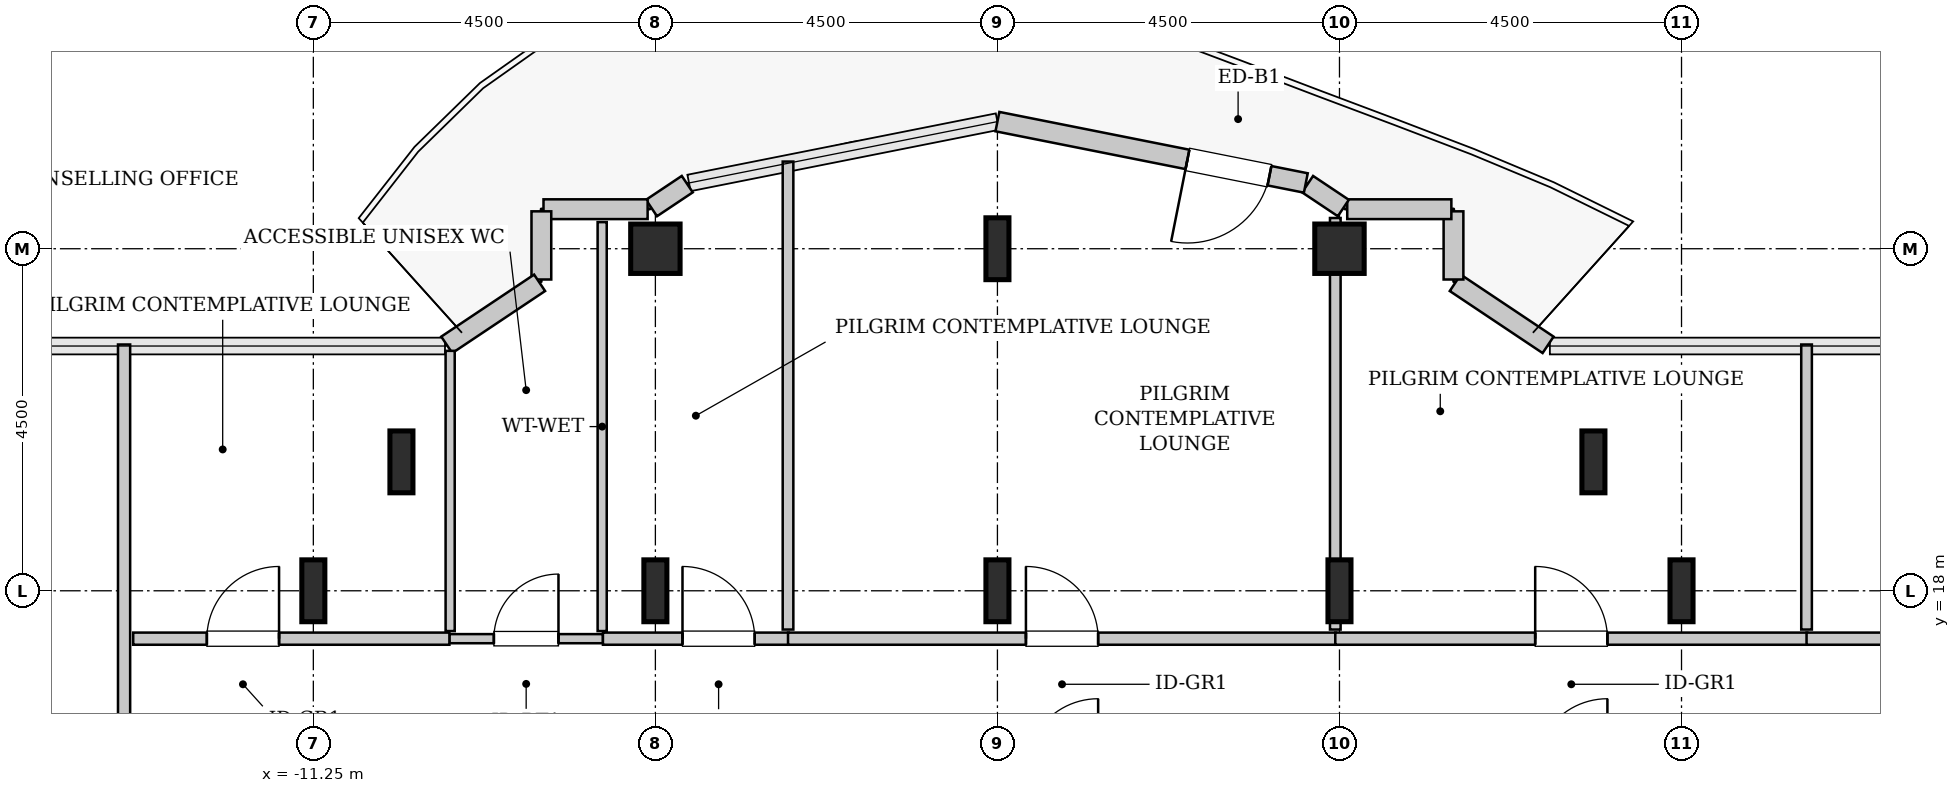
"""IFC4 building model, lengths in metres.
Left out: names, types, materials, properties, quantities, classifications, styles, units other than length and angle.
Written with IfcOpenShell. Run it as: python <this file> out.ifc"""

import sys

from ifc_helpers import new_model, si_unit, direction, frame, frame_2d, origin, origin_2d, place, context, subcontext, project, spatial, rectangle, hollow_rectangle, i_section, extrude, source, transform, mapped, element, fill, save


model = new_model("IFC4")
c1 = context("Model", 3, precision=1e-05, world=origin(), true_north=direction((0.0, 1.0)))
c2 = subcontext(c1, "Body", "Model", "MODEL_VIEW")
j1 = project(units=[si_unit("LENGTHUNIT", "METRE"), si_unit("PLANEANGLEUNIT", "RADIAN")], contexts=[c1])
p1 = place(None, origin())
s1 = spatial("IfcSite", under=j1, at=p1, CompositionType="ELEMENT")
p2 = place(p1, origin())
s2 = spatial("IfcBuilding", under=s1, at=p2, CompositionType="ELEMENT")
p3 = place(p2, frame((0.0, 0.0, 240.8)))
s3 = spatial("IfcBuildingStorey", under=s2, at=p3, CompositionType="ELEMENT", Elevation=240.8)
m1 = source(origin(), c2, "Body", "SweptSolid", [
    extrude(i_section(OverallWidth=0.303, OverallDepth=0.814, WebThickness=0.021, FlangeThickness=0.04, FilletRadius=0.03, at=origin_2d()), origin(), (0.0, 0.0, 1.0), 3.8),
])
for number, where, z_axis, x_axis in (
    (1, (-11.25, 18.0, 0.0), (0.0, 0.0, 1.0), (1.0, 0.0, 0.0)),
    (2, (-10.091, 19.696, 0.0), (0.0, 0.0, 1.0), (1.0, 0.0, 0.0)),
    (3, (-6.75, 18.0, 0.0), (0.0, 0.0, 1.0), (1.0, 0.0, 0.0)),
):
    element("IfcColumn", number, at=place(p3, frame(where, z_axis=z_axis, x_axis=x_axis)), inside=s3, PredefinedType="COLUMN", context=c2, shape_type="MappedRepresentation", body=[
        mapped(m1, transform((0.0, 0.0, 0.0), x_axis=(1.0, 0.0, 0.0), y_axis=(0.0, 1.0, 0.0), z_axis=(0.0, 0.0, 1.0), scale=1.0)),
    ])
m2 = source(origin(), c2, "Body", "SweptSolid", [
    extrude(hollow_rectangle(XDim=0.65, YDim=0.65, WallThickness=0.032, InnerFilletRadius=0.032, OuterFilletRadius=0.064, at=origin_2d()), origin(), (0.0, 0.0, 1.0), 3.8),
])
p4 = place(p3, frame((-6.75, 22.5, 0.0), z_axis=(0.0, 0.0, 1.0), x_axis=(1.0, 0.0, 0.0)))
e4 = element("IfcColumn", 4, at=p4, inside=s3, PredefinedType="COLUMN", context=c2, shape_type="MappedRepresentation", body=[
    mapped(m2, transform((0.0, 0.0, 0.0), x_axis=(1.0, 0.0, 0.0), y_axis=(0.0, 1.0, 0.0), z_axis=(0.0, 0.0, 1.0), scale=1.0)),
])
for number, where, z_axis, x_axis in (
    (5, (-2.25, 18.0, 0.0), (0.0, 0.0, 1.0), (1.0, 0.0, 0.0)),
    (6, (-2.25, 22.5, 0.0), (0.0, 0.0, 1.0), (1.0, 0.0, 0.0)),
    (7, (2.25, 18.0, 0.0), (0.0, 0.0, 1.0), (1.0, 0.0, 0.0)),
):
    element("IfcColumn", number, at=place(p3, frame(where, z_axis=z_axis, x_axis=x_axis)), inside=s3, PredefinedType="COLUMN", context=c2, shape_type="MappedRepresentation", body=[
        mapped(m1, transform((0.0, 0.0, 0.0), x_axis=(1.0, 0.0, 0.0), y_axis=(0.0, 1.0, 0.0), z_axis=(0.0, 0.0, 1.0), scale=1.0)),
    ])
p5 = place(p3, frame((2.25, 22.5, 0.0), z_axis=(0.0, 0.0, 1.0), x_axis=(1.0, 0.0, 0.0)))
e8 = element("IfcColumn", 8, at=p5, inside=s3, PredefinedType="COLUMN", context=c2, shape_type="MappedRepresentation", body=[
    mapped(m2, transform((0.0, 0.0, 0.0), x_axis=(1.0, 0.0, 0.0), y_axis=(0.0, 1.0, 0.0), z_axis=(0.0, 0.0, 1.0), scale=1.0)),
])
for number, where, z_axis, x_axis in (
    (9, (5.591, 19.696, 0.0), (0.0, 0.0, 1.0), (1.0, 0.0, 0.0)),
    (10, (6.75, 18.0, 0.0), (0.0, 0.0, 1.0), (1.0, 0.0, 0.0)),
):
    element("IfcColumn", number, at=place(p3, frame(where, z_axis=z_axis, x_axis=x_axis)), inside=s3, PredefinedType="COLUMN", context=c2, shape_type="MappedRepresentation", body=[
        mapped(m1, transform((0.0, 0.0, 0.0), x_axis=(1.0, 0.0, 0.0), y_axis=(0.0, 1.0, 0.0), z_axis=(0.0, 0.0, 1.0), scale=1.0)),
    ])
m3 = source(origin(), c2, "Body", "SweptSolid", [
    extrude(rectangle(XDim=1.469, YDim=0.26, at=frame_2d((0.734, 0.0))), origin(), (0.0, 0.0, 1.0), 3.55),
])
p6 = place(p3, frame((4.995, 21.236, 0.0), z_axis=(0.0, 0.0, 1.0), x_axis=(-0.831461760506, 0.555581983884, 0.0)))
e11 = element("IfcWall", 11, at=p6, inside=s3, PredefinedType="SOLIDWALL", context=c2, shape_type="MappedRepresentation", body=[
    mapped(m3, transform((0.0, 0.0, 0.0), x_axis=(1.0, 0.0, 0.0), y_axis=(0.0, 1.0, 0.0), z_axis=(0.0, 0.0, 1.0), scale=1.0)),
])
m4 = source(origin(), c2, "Body", "SweptSolid", [
    extrude(rectangle(XDim=0.897, YDim=0.26, at=frame_2d((0.448, 0.0))), origin(), (0.0, 0.0, 1.0), 3.55),
])
p7 = place(p3, frame((3.75, 22.095, 0.0), z_axis=(0.0, 0.0, 1.0), x_axis=(0.0, 1.0, 0.0)))
e12 = element("IfcWall", 12, at=p7, inside=s3, PredefinedType="SOLIDWALL", context=c2, shape_type="MappedRepresentation", body=[
    mapped(m4, transform((0.0, 0.0, 0.0), x_axis=(1.0, 0.0, 0.0), y_axis=(0.0, 1.0, 0.0), z_axis=(0.0, 0.0, 1.0), scale=1.0)),
])
m5 = source(origin(), c2, "Body", "SweptSolid", [
    extrude(rectangle(XDim=1.37, YDim=0.26, at=frame_2d((0.685, 0.0))), origin(), (0.0, 0.0, 1.0), 3.55),
])
p8 = place(p3, frame((3.722, 23.02, 0.0), z_axis=(0.0, 0.0, 1.0), x_axis=(-1.0, 0.0, 0.0)))
e13 = element("IfcWall", 13, at=p8, inside=s3, PredefinedType="SOLIDWALL", context=c2, shape_type="MappedRepresentation", body=[
    mapped(m5, transform((0.0, 0.0, 0.0), x_axis=(1.0, 0.0, 0.0), y_axis=(0.0, 1.0, 0.0), z_axis=(0.0, 0.0, 1.0), scale=1.0)),
])
m6 = source(origin(), c2, "Body", "SweptSolid", [
    extrude(rectangle(XDim=0.565, YDim=0.26, at=frame_2d((0.283, 0.0))), origin(), (0.0, 0.0, 1.0), 3.55),
])
p9 = place(p3, frame((2.301, 23.036, 0.0), z_axis=(0.0, 0.0, 1.0), x_axis=(-0.831651492666, 0.555297933317, 0.0)))
e14 = element("IfcWall", 14, at=p9, inside=s3, PredefinedType="SOLIDWALL", context=c2, shape_type="MappedRepresentation", body=[
    mapped(m6, transform((0.0, 0.0, 0.0), x_axis=(1.0, 0.0, 0.0), y_axis=(0.0, 1.0, 0.0), z_axis=(0.0, 0.0, 1.0), scale=1.0)),
])
m7 = source(origin(), c2, "Body", "SweptSolid", [
    extrude(rectangle(XDim=4.137, YDim=0.26, at=frame_2d((2.068, 0.0))), origin(), (0.0, 0.0, 1.0), 3.55),
])
p10 = place(p3, frame((1.807, 23.365, 0.0), z_axis=(0.0, 0.0, 1.0), x_axis=(-0.980782170794, 0.195105954428, 0.0)))
e15 = element("IfcWall", 15, at=p10, inside=s3, PredefinedType="SOLIDWALL", context=c2, shape_type="MappedRepresentation", body=[
    mapped(m7, transform((0.0, 0.0, 0.0), x_axis=(1.0, 0.0, 0.0), y_axis=(0.0, 1.0, 0.0), z_axis=(0.0, 0.0, 1.0), scale=1.0)),
])
p11 = place(p10, frame((0.488, 0.0, 0.0)))
e16 = element("IfcOpeningElement", 16, at=p11, cuts=e15, PredefinedType="OPENING", context=c2, shape_type="SweptSolid", body=[
    extrude(rectangle(XDim=1.1, YDim=2.2, at=frame_2d((0.55, 1.1))), frame((0.0, 0.14, 0.0), z_axis=(0.0, -1.0, 0.0), x_axis=(1.0, 0.0, 0.0)), (0.0, 0.0, 1.0), 0.28),
])
p12 = place(p3, frame((-6.331, 23.35, 0.0), z_axis=(0.0, 0.0, 1.0), x_axis=(-0.831651492666, -0.555297933317, 0.0)))
e17 = element("IfcWall", 17, at=p12, inside=s3, PredefinedType="SOLIDWALL", context=c2, shape_type="MappedRepresentation", body=[
    mapped(m6, transform((0.0, 0.0, 0.0), x_axis=(1.0, 0.0, 0.0), y_axis=(0.0, 1.0, 0.0), z_axis=(0.0, 0.0, 1.0), scale=1.0)),
])
p13 = place(p3, frame((-6.852, 23.02, 0.0), z_axis=(0.0, 0.0, 1.0), x_axis=(-1.0, 0.0, 0.0)))
e18 = element("IfcWall", 18, at=p13, inside=s3, PredefinedType="SOLIDWALL", context=c2, shape_type="MappedRepresentation", body=[
    mapped(m5, transform((0.0, 0.0, 0.0), x_axis=(1.0, 0.0, 0.0), y_axis=(0.0, 1.0, 0.0), z_axis=(0.0, 0.0, 1.0), scale=1.0)),
])
p14 = place(p3, frame((-8.25, 22.992, 0.0), z_axis=(0.0, 0.0, 1.0), x_axis=(0.0, -1.0, 0.0)))
e19 = element("IfcWall", 19, at=p14, inside=s3, PredefinedType="SOLIDWALL", context=c2, shape_type="MappedRepresentation", body=[
    mapped(m4, transform((0.0, 0.0, 0.0), x_axis=(1.0, 0.0, 0.0), y_axis=(0.0, 1.0, 0.0), z_axis=(0.0, 0.0, 1.0), scale=1.0)),
])
p15 = place(p3, frame((-8.273, 22.052, 0.0), z_axis=(0.0, 0.0, 1.0), x_axis=(-0.831461760506, -0.555581983884, 0.0)))
e20 = element("IfcWall", 20, at=p15, inside=s3, PredefinedType="SOLIDWALL", context=c2, shape_type="MappedRepresentation", body=[
    mapped(m3, transform((0.0, 0.0, 0.0), x_axis=(1.0, 0.0, 0.0), y_axis=(0.0, 1.0, 0.0), z_axis=(0.0, 0.0, 1.0), scale=1.0)),
])
m8 = source(origin(), c2, "Body", "SweptSolid", [
    extrude(rectangle(XDim=2.02, YDim=0.12, at=frame_2d((1.01, 0.0))), origin(), (0.0, 0.0, 1.0), 3.535),
])
p16 = place(p3, frame((-9.46, 17.37, 0.0), z_axis=(0.0, 0.0, 1.0), x_axis=(1.0, 0.0, 0.0)))
e21 = element("IfcWall", 21, at=p16, inside=s3, PredefinedType="PLUMBINGWALL", context=c2, shape_type="MappedRepresentation", body=[
    mapped(m8, transform((0.0, 0.0, 0.0), x_axis=(1.0, 0.0, 0.0), y_axis=(0.0, 1.0, 0.0), z_axis=(0.0, 0.0, 1.0), scale=1.0)),
])
p17 = place(p16, frame((0.585, 0.0, 0.0)))
e22 = element("IfcOpeningElement", 22, at=p17, cuts=e21, PredefinedType="OPENING", context=c2, shape_type="SweptSolid", body=[
    extrude(rectangle(XDim=0.85, YDim=2.1, at=frame_2d((0.425, 1.05))), frame((0.0, 0.07, 0.0), z_axis=(0.0, -1.0, 0.0), x_axis=(1.0, 0.0, 0.0)), (0.0, 0.0, 1.0), 0.14),
])
m9 = source(origin(), c2, "Body", "SweptSolid", [
    extrude(rectangle(XDim=5.38, YDim=0.12, at=frame_2d((2.69, 0.0))), origin(), (0.0, 0.0, 1.0), 3.535),
])
p18 = place(p3, frame((-7.45, 17.47, 0.0), z_axis=(0.0, 0.0, 1.0), x_axis=(0.0, 1.0, 0.0)))
e23 = element("IfcWall", 23, at=p18, inside=s3, PredefinedType="PLUMBINGWALL", context=c2, shape_type="MappedRepresentation", body=[
    mapped(m9, transform((0.0, 0.0, 0.0), x_axis=(1.0, 0.0, 0.0), y_axis=(0.0, 1.0, 0.0), z_axis=(0.0, 0.0, 1.0), scale=1.0)),
])
m10 = source(origin(), c2, "Body", "SweptSolid", [
    extrude(rectangle(XDim=3.687, YDim=0.12, at=frame_2d((1.843, 0.0))), origin(), (0.0, 0.0, 1.0), 3.535),
])
p19 = place(p3, frame((-9.45, 17.47, 0.0), z_axis=(0.0, 0.0, 1.0), x_axis=(0.0, 1.0, 0.0)))
e24 = element("IfcWall", 24, at=p19, inside=s3, PredefinedType="PLUMBINGWALL", context=c2, shape_type="MappedRepresentation", body=[
    mapped(m10, transform((0.0, 0.0, 0.0), x_axis=(1.0, 0.0, 0.0), y_axis=(0.0, 1.0, 0.0), z_axis=(0.0, 0.0, 1.0), scale=1.0)),
])
m11 = source(origin(), c2, "Body", "SweptSolid", [
    extrude(rectangle(XDim=6.952, YDim=0.16, at=frame_2d((3.476, 0.0))), origin(), (0.0, 0.0, 1.0), 3.535),
])
p20 = place(p3, frame((-13.74, 14.288, 0.0), z_axis=(0.0, 0.0, 1.0), x_axis=(0.0, 1.0, 0.0)))
e25 = element("IfcWall", 25, at=p20, inside=s3, PredefinedType="PARTITIONING", context=c2, shape_type="MappedRepresentation", body=[
    mapped(m11, transform((0.0, 0.0, 0.0), x_axis=(1.0, 0.0, 0.0), y_axis=(0.0, 1.0, 0.0), z_axis=(0.0, 0.0, 1.0), scale=1.0)),
])
p21 = place(p20, frame((1.086, 0.0, 0.0)))
e26 = element("IfcOpeningElement", 26, at=p21, cuts=e25, PredefinedType="OPENING", context=c2, shape_type="SweptSolid", body=[
    extrude(rectangle(XDim=0.95, YDim=2.1, at=frame_2d((0.475, 1.05))), frame((0.0, 0.09, 0.0), z_axis=(0.0, -1.0, 0.0), x_axis=(1.0, 0.0, 0.0)), (0.0, 0.0, 1.0), 0.18),
])
m12 = source(origin(), c2, "Body", "SweptSolid", [
    extrude(rectangle(XDim=2.445, YDim=0.16, at=frame_2d((1.222, 0.0))), origin(), (0.0, 0.0, 1.0), 3.535),
])
p22 = place(p3, frame((-7.44, 17.37, 0.0), z_axis=(0.0, 0.0, 1.0), x_axis=(1.0, 0.0, 0.0)))
e27 = element("IfcWall", 27, at=p22, inside=s3, PredefinedType="PARTITIONING", context=c2, shape_type="MappedRepresentation", body=[
    mapped(m12, transform((0.0, 0.0, 0.0), x_axis=(1.0, 0.0, 0.0), y_axis=(0.0, 1.0, 0.0), z_axis=(0.0, 0.0, 1.0), scale=1.0)),
])
p23 = place(p22, frame((1.047, 0.0, 0.0)))
e28 = element("IfcOpeningElement", 28, at=p23, cuts=e27, PredefinedType="OPENING", context=c2, shape_type="SweptSolid", body=[
    extrude(rectangle(XDim=0.95, YDim=2.1, at=frame_2d((0.475, 1.05))), frame((0.0, 0.09, 0.0), z_axis=(0.0, -1.0, 0.0), x_axis=(1.0, 0.0, 0.0)), (0.0, 0.0, 1.0), 0.18),
])
m13 = source(origin(), c2, "Body", "SweptSolid", [
    extrude(rectangle(XDim=6.157, YDim=0.14, at=frame_2d((3.078, 0.0))), origin(), (0.0, 0.0, 1.0), 3.535),
])
p24 = place(p3, frame((-5.005, 17.49, 0.0), z_axis=(0.0, 0.0, 1.0), x_axis=(0.0, 1.0, 0.0)))
e29 = element("IfcWall", 29, at=p24, inside=s3, PredefinedType="PARTITIONING", context=c2, shape_type="MappedRepresentation", body=[
    mapped(m13, transform((0.0, 0.0, 0.0), x_axis=(1.0, 0.0, 0.0), y_axis=(0.0, 1.0, 0.0), z_axis=(0.0, 0.0, 1.0), scale=1.0)),
])
m14 = source(origin(), c2, "Body", "SweptSolid", [
    extrude(rectangle(XDim=4.16, YDim=0.16, at=frame_2d((2.08, 0.0))), origin(), (0.0, 0.0, 1.0), 3.535),
])
p25 = place(p3, frame((-13.62, 17.37, 0.0), z_axis=(0.0, 0.0, 1.0), x_axis=(1.0, 0.0, 0.0)))
e30 = element("IfcWall", 30, at=p25, inside=s3, PredefinedType="PARTITIONING", context=c2, shape_type="MappedRepresentation", body=[
    mapped(m14, transform((0.0, 0.0, 0.0), x_axis=(1.0, 0.0, 0.0), y_axis=(0.0, 1.0, 0.0), z_axis=(0.0, 0.0, 1.0), scale=1.0)),
])
p26 = place(p25, frame((0.969, 0.0, 0.0)))
e31 = element("IfcOpeningElement", 31, at=p26, cuts=e30, PredefinedType="OPENING", context=c2, shape_type="SweptSolid", body=[
    extrude(rectangle(XDim=0.95, YDim=2.1, at=frame_2d((0.475, 1.05))), frame((0.0, 0.09, 0.0), z_axis=(0.0, -1.0, 0.0), x_axis=(1.0, 0.0, 0.0)), (0.0, 0.0, 1.0), 0.18),
])
m15 = source(origin(), c2, "Body", "SweptSolid", [
    extrude(rectangle(XDim=7.21, YDim=0.16, at=frame_2d((3.605, 0.0))), origin(), (0.0, 0.0, 1.0), 3.535),
])
p27 = place(p3, frame((-5.005, 17.37, 0.0), z_axis=(0.0, 0.0, 1.0), x_axis=(1.0, 0.0, 0.0)))
e32 = element("IfcWall", 32, at=p27, inside=s3, PredefinedType="PARTITIONING", context=c2, shape_type="MappedRepresentation", body=[
    mapped(m15, transform((0.0, 0.0, 0.0), x_axis=(1.0, 0.0, 0.0), y_axis=(0.0, 1.0, 0.0), z_axis=(0.0, 0.0, 1.0), scale=1.0)),
])
p28 = place(p27, frame((3.13, 0.0, 0.0)))
e33 = element("IfcOpeningElement", 33, at=p28, cuts=e32, PredefinedType="OPENING", context=c2, shape_type="SweptSolid", body=[
    extrude(rectangle(XDim=0.95, YDim=2.1, at=frame_2d((0.475, 1.05))), frame((0.0, 0.09, 0.0), z_axis=(0.0, -1.0, 0.0), x_axis=(1.0, 0.0, 0.0)), (0.0, 0.0, 1.0), 0.18),
])
m16 = source(origin(), c2, "Body", "SweptSolid", [
    extrude(rectangle(XDim=5.414, YDim=0.14, at=frame_2d((2.707, 0.0))), origin(), (0.0, 0.0, 1.0), 2.925),
])
p29 = place(p3, frame((2.195, 17.49, 0.0), z_axis=(0.0, 0.0, 1.0), x_axis=(0.0, 1.0, 0.0)))
e34 = element("IfcWall", 34, at=p29, inside=s3, PredefinedType="PARTITIONING", context=c2, shape_type="MappedRepresentation", body=[
    mapped(m16, transform((0.0, 0.0, 0.0), x_axis=(1.0, 0.0, 0.0), y_axis=(0.0, 1.0, 0.0), z_axis=(0.0, 0.0, 1.0), scale=1.0)),
])
m17 = source(origin(), c2, "Body", "SweptSolid", [
    extrude(rectangle(XDim=6.21, YDim=0.16, at=frame_2d((3.105, 0.0))), origin(), (0.0, 0.0, 1.0), 3.535),
])
p30 = place(p3, frame((2.195, 17.37, 0.0), z_axis=(0.0, 0.0, 1.0), x_axis=(1.0, 0.0, 0.0)))
e35 = element("IfcWall", 35, at=p30, inside=s3, PredefinedType="PARTITIONING", context=c2, shape_type="MappedRepresentation", body=[
    mapped(m17, transform((0.0, 0.0, 0.0), x_axis=(1.0, 0.0, 0.0), y_axis=(0.0, 1.0, 0.0), z_axis=(0.0, 0.0, 1.0), scale=1.0)),
])
p31 = place(p30, frame((2.63, 0.0, 0.0)))
e36 = element("IfcOpeningElement", 36, at=p31, cuts=e35, PredefinedType="OPENING", context=c2, shape_type="SweptSolid", body=[
    extrude(rectangle(XDim=0.95, YDim=2.1, at=frame_2d((0.475, 1.05))), frame((0.0, 0.09, 0.0), z_axis=(0.0, -1.0, 0.0), x_axis=(1.0, 0.0, 0.0)), (0.0, 0.0, 1.0), 0.18),
])
m18 = source(origin(), c2, "Body", "SweptSolid", [
    extrude(rectangle(XDim=3.75, YDim=0.14, at=frame_2d((1.875, 0.0))), origin(), (0.0, 0.0, 1.0), 3.535),
])
p32 = place(p3, frame((8.395, 17.49, 0.0), z_axis=(0.0, 0.0, 1.0), x_axis=(0.0, 1.0, 0.0)))
e37 = element("IfcWall", 37, at=p32, inside=s3, PredefinedType="PARTITIONING", context=c2, shape_type="MappedRepresentation", body=[
    mapped(m18, transform((0.0, 0.0, 0.0), x_axis=(1.0, 0.0, 0.0), y_axis=(0.0, 1.0, 0.0), z_axis=(0.0, 0.0, 1.0), scale=1.0)),
])
m19 = source(origin(), c2, "Body", "SweptSolid", [
    extrude(rectangle(XDim=5.225, YDim=0.16, at=frame_2d((2.613, 0.0))), origin(), (0.0, 0.0, 1.0), 3.535),
])
p33 = place(p3, frame((8.395, 17.37, 0.0), z_axis=(0.0, 0.0, 1.0), x_axis=(1.0, 0.0, 0.0)))
e38 = element("IfcWall", 38, at=p33, inside=s3, PredefinedType="PARTITIONING", context=c2, shape_type="MappedRepresentation", body=[
    mapped(m19, transform((0.0, 0.0, 0.0), x_axis=(1.0, 0.0, 0.0), y_axis=(0.0, 1.0, 0.0), z_axis=(0.0, 0.0, 1.0), scale=1.0)),
])
p34 = place(p33, frame((1.543, 0.0, 0.0)))
e39 = element("IfcOpeningElement", 39, at=p34, cuts=e38, PredefinedType="OPENING", context=c2, shape_type="SweptSolid", body=[
    extrude(rectangle(XDim=0.95, YDim=2.1, at=frame_2d((0.475, 1.05))), frame((0.0, 0.09, 0.0), z_axis=(0.0, -1.0, 0.0), x_axis=(1.0, 0.0, 0.0)), (0.0, 0.0, 1.0), 0.18),
])
m20 = source(origin(), c2, "Body", "SweptSolid", [
    extrude(rectangle(XDim=1.1, YDim=2.2, at=frame_2d((0.55, 1.1))), frame((0.0, 0.025, 0.0), z_axis=(0.0, -1.0, 0.0), x_axis=(1.0, 0.0, 0.0)), (0.0, 0.0, 1.0), 0.05),
])
p35 = place(p11, origin())
e40 = element("IfcDoor", 40, at=p35, inside=s3, OperationType="SINGLE_SWING_RIGHT", PredefinedType="DOOR", context=c2, shape_type="MappedRepresentation", body=[
    mapped(m20, transform((0.0, 0.0, 0.0), x_axis=(1.0, 0.0, 0.0), y_axis=(0.0, 1.0, 0.0), z_axis=(0.0, 0.0, 1.0), scale=1.0)),
])
fill(e16, e40)
m21 = source(origin(), c2, "Body", "SweptSolid", [
    extrude(rectangle(XDim=0.85, YDim=2.1, at=frame_2d((0.425, 1.05))), frame((0.0, 0.025, 0.0), z_axis=(0.0, -1.0, 0.0), x_axis=(1.0, 0.0, 0.0)), (0.0, 0.0, 1.0), 0.05),
])
p36 = place(p17, origin())
e41 = element("IfcDoor", 41, at=p36, inside=s3, OperationType="SINGLE_SWING_RIGHT", PredefinedType="DOOR", context=c2, shape_type="MappedRepresentation", body=[
    mapped(m21, transform((0.0, 0.0, 0.0), x_axis=(1.0, 0.0, 0.0), y_axis=(0.0, 1.0, 0.0), z_axis=(0.0, 0.0, 1.0), scale=1.0)),
])
fill(e22, e41)
m22 = source(origin(), c2, "Body", "SweptSolid", [
    extrude(rectangle(XDim=0.95, YDim=2.1, at=frame_2d((0.475, 1.05))), frame((0.0, 0.025, 0.0), z_axis=(0.0, -1.0, 0.0), x_axis=(1.0, 0.0, 0.0)), (0.0, 0.0, 1.0), 0.05),
])
p37 = place(p23, origin())
e42 = element("IfcDoor", 42, at=p37, inside=s3, OperationType="SINGLE_SWING_LEFT", PredefinedType="DOOR", context=c2, shape_type="MappedRepresentation", body=[
    mapped(m22, transform((0.0, 0.0, 0.0), x_axis=(1.0, 0.0, 0.0), y_axis=(0.0, 1.0, 0.0), z_axis=(0.0, 0.0, 1.0), scale=1.0)),
])
fill(e28, e42)
p38 = place(p26, origin())
e43 = element("IfcDoor", 43, at=p38, inside=s3, OperationType="SINGLE_SWING_RIGHT", PredefinedType="DOOR", context=c2, shape_type="MappedRepresentation", body=[
    mapped(m22, transform((0.0, 0.0, 0.0), x_axis=(1.0, 0.0, 0.0), y_axis=(0.0, 1.0, 0.0), z_axis=(0.0, 0.0, 1.0), scale=1.0)),
])
fill(e31, e43)
p39 = place(p28, origin())
e44 = element("IfcDoor", 44, at=p39, inside=s3, OperationType="SINGLE_SWING_LEFT", PredefinedType="DOOR", context=c2, shape_type="MappedRepresentation", body=[
    mapped(m22, transform((0.0, 0.0, 0.0), x_axis=(1.0, 0.0, 0.0), y_axis=(0.0, 1.0, 0.0), z_axis=(0.0, 0.0, 1.0), scale=1.0)),
])
fill(e33, e44)
p40 = place(p31, origin())
e45 = element("IfcDoor", 45, at=p40, inside=s3, OperationType="SINGLE_SWING_LEFT", PredefinedType="DOOR", context=c2, shape_type="MappedRepresentation", body=[
    mapped(m22, transform((0.0, 0.0, 0.0), x_axis=(1.0, 0.0, 0.0), y_axis=(0.0, 1.0, 0.0), z_axis=(0.0, 0.0, 1.0), scale=1.0)),
])
fill(e36, e45)
save(model, sys.argv[1])
